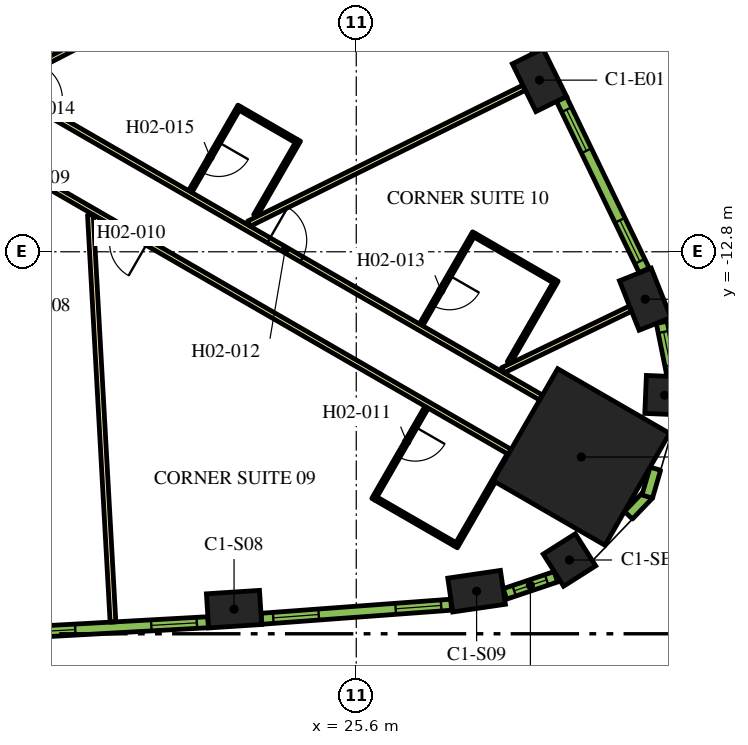
"""IFC4 building model, lengths in metres.
Left out: names, types, materials, properties, quantities, classifications, styles, units other than length and angle.
Written with IfcOpenShell. Run it as: python <this file> out.ifc"""

import sys

from ifc_helpers import new_model, si_unit, direction, frame, frame_2d, origin, origin_2d, place, context, subcontext, project, spatial, rectangle, extrude, element, fill, save


model = new_model("IFC4")
c1 = context("Model", 3, precision=1e-05, world=origin(), true_north=direction((0.0, 1.0)))
c2 = subcontext(c1, "Body", "Model", "MODEL_VIEW")
j1 = project(units=[si_unit("LENGTHUNIT", "METRE"), si_unit("PLANEANGLEUNIT", "RADIAN")], contexts=[c1])
p1 = place(None, origin())
s1 = spatial("IfcSite", under=j1, at=p1, CompositionType="ELEMENT")
p2 = place(p1, origin())
s2 = spatial("IfcBuilding", under=s1, at=p2, CompositionType="ELEMENT")
p3 = place(p2, frame((0.0, 0.0, 47.1)))
s3 = spatial("IfcBuildingStorey", under=s2, at=p3, CompositionType="ELEMENT", Elevation=47.1)
p4 = place(p3, frame((31.522, -18.199, 0.0), z_axis=(0.0, 0.0, 1.0), x_axis=(0.866025403784, -0.5, 0.0)))
e1 = element("IfcColumn", 1, at=p4, inside=s3, PredefinedType="COLUMN", context=c2, shape_type="SweptSolid", body=[
    extrude(rectangle(XDim=3.4, YDim=3.4, at=origin_2d()), origin(), (0.0, 0.0, 1.0), 3.9),
])
for number, where, z_axis, x_axis in (
    (2, (22.385, -22.204, 0.0), (0.0, 0.0, 1.0), (0.998, 0.065, 0.0)),
    (3, (28.767, -21.731, 0.0), (0.0, 0.0, 1.0), (0.989, 0.145, 0.0)),
):
    element("IfcColumn", number, at=place(p3, frame(where, z_axis=z_axis, x_axis=x_axis)), inside=s3, PredefinedType="COLUMN", context=c2, shape_type="SweptSolid", body=[
        extrude(rectangle(XDim=1.4, YDim=0.9, at=origin_2d()), origin(), (0.0, 0.0, 1.0), 3.9),
    ])
for number, where, z_axis, x_axis in (
    (4, (31.21, -20.91, 0.0), (0.0, 0.0, 1.0), (0.844, 0.536, 0.0)),
    (5, (33.713, -16.574, 0.0), (0.0, 0.0, 1.0), (0.042, 0.999, 0.0)),
):
    element("IfcColumn", number, at=place(p3, frame(where, z_axis=z_axis, x_axis=x_axis)), inside=s3, PredefinedType="COLUMN", context=c2, shape_type="SweptSolid", body=[
        extrude(rectangle(XDim=1.0, YDim=1.0, at=origin_2d()), origin(), (0.0, 0.0, 1.0), 3.9),
    ])
for number, where, z_axis, x_axis in (
    (6, (33.203, -14.047, 0.0), (0.0, 0.0, 1.0), (-0.369, 0.929, 0.0)),
    (7, (30.421, -8.284, 0.0), (0.0, 0.0, 1.0), (-0.443, 0.897, 0.0)),
):
    element("IfcColumn", number, at=place(p3, frame(where, z_axis=z_axis, x_axis=x_axis)), inside=s3, PredefinedType="COLUMN", context=c2, shape_type="SweptSolid", body=[
        extrude(rectangle(XDim=1.4, YDim=0.9, at=origin_2d()), origin(), (0.0, 0.0, 1.0), 3.9),
    ])
p5 = place(p3, frame((16.412, -8.523, 0.0), z_axis=(0.0, 0.0, 1.0), x_axis=(0.866022197818, -0.500005552856, 0.0)))
e8 = element("IfcWall", 8, at=p5, inside=s3, PredefinedType="PARTITIONING", context=c2, shape_type="SweptSolid", body=[
    extrude(rectangle(XDim=16.224, YDim=0.15, at=frame_2d((8.112, 0.0))), origin(), (0.0, 0.0, 1.0), 2.75),
])
p6 = place(p5, frame((7.949, 0.0, 0.0)))
e9 = element("IfcOpeningElement", 9, at=p6, cuts=e8, PredefinedType="OPENING", context=c2, shape_type="SweptSolid", body=[
    extrude(rectangle(XDim=1.0, YDim=2.1, at=frame_2d((0.5, 1.05))), frame((0.0, 0.085, 0.0), z_axis=(0.0, -1.0, 0.0), x_axis=(1.0, 0.0, 0.0)), (0.0, 0.0, 1.0), 0.17),
])
p7 = place(p5, frame((0.526, 0.0, 0.0)))
e10 = element("IfcOpeningElement", 10, at=p7, cuts=e8, PredefinedType="OPENING", context=c2, shape_type="SweptSolid", body=[
    extrude(rectangle(XDim=1.0, YDim=2.1, at=frame_2d((0.5, 1.05))), frame((0.0, 0.085, 0.0), z_axis=(0.0, -1.0, 0.0), x_axis=(1.0, 0.0, 0.0)), (0.0, 0.0, 1.0), 0.17),
])
p8 = place(p3, frame((19.081, -3.9, 0.0), z_axis=(0.0, 0.0, 1.0), x_axis=(-0.499974327079, -0.866040225545, 0.0)))
e11 = element("IfcWall", 11, at=p8, inside=s3, PredefinedType="PARTITIONING", context=c2, shape_type="SweptSolid", body=[
    extrude(rectangle(XDim=5.258, YDim=0.15, at=frame_2d((2.629, 0.0))), origin(), (0.0, 0.0, 1.0), 2.75),
])
p9 = place(p3, frame((29.638, -18.064, 0.0), z_axis=(0.0, 0.0, 1.0), x_axis=(-0.866026175601, 0.499998663172, 0.0)))
e12 = element("IfcWall", 12, at=p9, inside=s3, PredefinedType="PARTITIONING", context=c2, shape_type="SweptSolid", body=[
    extrude(rectangle(XDim=16.144, YDim=0.15, at=frame_2d((8.072, 0.0))), origin(), (0.0, 0.0, 1.0), 2.75),
])
p10 = place(p9, frame((13.948, 0.0, 0.0)))
e13 = element("IfcOpeningElement", 13, at=p10, cuts=e12, PredefinedType="OPENING", context=c2, shape_type="SweptSolid", body=[
    extrude(rectangle(XDim=0.9, YDim=2.1, at=frame_2d((0.45, 1.05))), frame((0.0, 0.085, 0.0), z_axis=(0.0, -1.0, 0.0), x_axis=(1.0, 0.0, 0.0)), (0.0, 0.0, 1.0), 0.17),
])
p11 = place(p9, frame((11.004, 0.0, 0.0)))
e14 = element("IfcOpeningElement", 14, at=p11, cuts=e12, PredefinedType="OPENING", context=c2, shape_type="SweptSolid", body=[
    extrude(rectangle(XDim=1.0, YDim=2.1, at=frame_2d((0.5, 1.05))), frame((0.0, 0.085, 0.0), z_axis=(0.0, -1.0, 0.0), x_axis=(1.0, 0.0, 0.0)), (0.0, 0.0, 1.0), 0.17),
])
p12 = place(p3, frame((27.134, -2.779, 0.0), z_axis=(0.0, 0.0, 1.0), x_axis=(-0.8882049501, -0.459447457951, 0.0)))
e15 = element("IfcWall", 15, at=p12, inside=s3, PredefinedType="PARTITIONING", context=c2, shape_type="SweptSolid", body=[
    extrude(rectangle(XDim=11.638, YDim=0.15, at=frame_2d((5.819, 0.0))), origin(), (0.0, 0.0, 1.0), 2.75),
])
p13 = place(p3, frame((19.198, -22.541, 0.0), z_axis=(0.0, 0.0, 1.0), x_axis=(-0.055432210572, 0.99846245299, 0.0)))
e16 = element("IfcWall", 16, at=p13, inside=s3, PredefinedType="PARTITIONING", context=c2, shape_type="SweptSolid", body=[
    extrude(rectangle(XDim=10.729, YDim=0.15, at=frame_2d((5.365, 0.0))), origin(), (0.0, 0.0, 1.0), 2.75),
])
p14 = place(p3, frame((30.018, -8.483, 0.0), z_axis=(0.0, 0.0, 1.0), x_axis=(-0.896544505264, -0.44295366584, 0.0)))
e17 = element("IfcWall", 17, at=p14, inside=s3, PredefinedType="PARTITIONING", context=c2, shape_type="SweptSolid", body=[
    extrude(rectangle(XDim=8.079, YDim=0.15, at=frame_2d((4.04, 0.0))), origin(), (0.0, 0.0, 1.0), 2.75),
])
p15 = place(p3, frame((32.817, -14.296, 0.0), z_axis=(0.0, 0.0, 1.0), x_axis=(-0.900616957918, -0.434613730927, 0.0)))
e18 = element("IfcWall", 18, at=p15, inside=s3, PredefinedType="PARTITIONING", context=c2, shape_type="SweptSolid", body=[
    extrude(rectangle(XDim=3.733, YDim=0.15, at=frame_2d((1.867, 0.0))), origin(), (0.0, 0.0, 1.0), 2.75),
])
p16 = place(p3, frame((27.452, -16.889, 0.0), z_axis=(0.0, 0.0, 1.0), x_axis=(-0.49998411664, -0.866034573852, 0.0)))
e19 = element("IfcWall", 19, at=p16, inside=s3, PredefinedType="PARTITIONING", context=c2, shape_type="SweptSolid", body=[
    extrude(rectangle(XDim=2.8, YDim=0.1, at=frame_2d((1.4, 0.0))), origin(), (0.0, 0.0, 1.0), 2.75),
])
p17 = place(p16, frame((0.6, 0.0, 0.0)))
e20 = element("IfcOpeningElement", 20, at=p17, cuts=e19, PredefinedType="OPENING", context=c2, shape_type="SweptSolid", body=[
    extrude(rectangle(XDim=0.9, YDim=2.1, at=frame_2d((0.45, 1.05))), frame((0.0, 0.06, 0.0), z_axis=(0.0, -1.0, 0.0), x_axis=(1.0, 0.0, 0.0)), (0.0, 0.0, 1.0), 0.12),
])
p18 = place(p3, frame((26.121, -19.295, 0.0), z_axis=(0.0, 0.0, 1.0), x_axis=(0.866006032174, -0.500033551112, 0.0)))
e21 = element("IfcWall", 21, at=p18, inside=s3, PredefinedType="PARTITIONING", context=c2, shape_type="SweptSolid", body=[
    extrude(rectangle(XDim=2.4, YDim=0.1, at=frame_2d((1.2, 0.0))), origin(), (0.0, 0.0, 1.0), 2.75),
])
p19 = place(p3, frame((29.617, -18.139, 0.0), z_axis=(0.0, 0.0, 1.0), x_axis=(-0.49998411664, -0.866034573852, 0.0)))
e22 = element("IfcWall", 22, at=p19, inside=s3, PredefinedType="PARTITIONING", context=c2, shape_type="SweptSolid", body=[
    extrude(rectangle(XDim=2.8, YDim=0.1, at=frame_2d((1.4, 0.0))), origin(), (0.0, 0.0, 1.0), 2.75),
])
p20 = place(p3, frame((28.704, -12.3, 0.0), z_axis=(0.0, 0.0, 1.0), x_axis=(-0.49998411664, -0.866034573852, 0.0)))
e23 = element("IfcWall", 23, at=p20, inside=s3, PredefinedType="PARTITIONING", context=c2, shape_type="SweptSolid", body=[
    extrude(rectangle(XDim=2.8, YDim=0.1, at=frame_2d((1.4, 0.0))), origin(), (0.0, 0.0, 1.0), 2.75),
])
p21 = place(p20, frame((1.3, 0.0, 0.0)))
e24 = element("IfcOpeningElement", 24, at=p21, cuts=e23, PredefinedType="OPENING", context=c2, shape_type="SweptSolid", body=[
    extrude(rectangle(XDim=0.9, YDim=2.1, at=frame_2d((0.45, 1.05))), frame((0.0, 0.06, 0.0), z_axis=(0.0, -1.0, 0.0), x_axis=(1.0, 0.0, 0.0)), (0.0, 0.0, 1.0), 0.12),
])
p22 = place(p3, frame((28.722, -12.368, 0.0), z_axis=(0.0, 0.0, 1.0), x_axis=(0.866050077142, -0.499957262057, 0.0)))
e25 = element("IfcWall", 25, at=p22, inside=s3, PredefinedType="PARTITIONING", context=c2, shape_type="SweptSolid", body=[
    extrude(rectangle(XDim=2.4, YDim=0.1, at=frame_2d((1.2, 0.0))), origin(), (0.0, 0.0, 1.0), 2.75),
])
p23 = place(p3, frame((29.619, -15.715, 0.0), z_axis=(0.0, 0.0, 1.0), x_axis=(0.500004234368, 0.866022959057, 0.0)))
e26 = element("IfcWall", 26, at=p23, inside=s3, PredefinedType="PARTITIONING", context=c2, shape_type="SweptSolid", body=[
    extrude(rectangle(XDim=2.5, YDim=0.1, at=frame_2d((1.25, 0.0))), origin(), (0.0, 0.0, 1.0), 2.75),
])
p24 = place(p3, frame((22.53, -8.966, 0.0), z_axis=(0.0, 0.0, 1.0), x_axis=(-0.500006934395, -0.866021400173, 0.0)))
e27 = element("IfcWall", 27, at=p24, inside=s3, PredefinedType="PARTITIONING", context=c2, shape_type="SweptSolid", body=[
    extrude(rectangle(XDim=2.6, YDim=0.1, at=frame_2d((1.3, 0.0))), origin(), (0.0, 0.0, 1.0), 2.75),
])
p25 = place(p24, frame((1.1, 0.0, 0.0)))
e28 = element("IfcOpeningElement", 28, at=p25, cuts=e27, PredefinedType="OPENING", context=c2, shape_type="SweptSolid", body=[
    extrude(rectangle(XDim=0.9, YDim=2.1, at=frame_2d((0.45, 1.05))), frame((0.0, 0.06, 0.0), z_axis=(0.0, -1.0, 0.0), x_axis=(1.0, 0.0, 0.0)), (0.0, 0.0, 1.0), 0.12),
])
p26 = place(p3, frame((22.549, -9.035, 0.0), z_axis=(0.0, 0.0, 1.0), x_axis=(0.86605165483, -0.499954529098, 0.0)))
e29 = element("IfcWall", 29, at=p26, inside=s3, PredefinedType="PARTITIONING", context=c2, shape_type="SweptSolid", body=[
    extrude(rectangle(XDim=1.7, YDim=0.1, at=frame_2d((0.85, 0.0))), origin(), (0.0, 0.0, 1.0), 2.75),
])
p27 = place(p3, frame((22.944, -11.85, 0.0), z_axis=(0.0, 0.0, 1.0), x_axis=(0.499968531483, 0.866043571379, 0.0)))
e30 = element("IfcWall", 30, at=p27, inside=s3, PredefinedType="PARTITIONING", context=c2, shape_type="SweptSolid", body=[
    extrude(rectangle(XDim=2.29, YDim=0.1, at=frame_2d((1.145, 0.0))), origin(), (0.0, 0.0, 1.0), 2.75),
])
p28 = place(p3, frame((16.711, -22.824, 0.0), z_axis=(0.0, 0.0, 1.0), x_axis=(0.998464708705, 0.055391564976, 0.0)))
e31 = element("IfcWall", 31, at=p28, inside=s3, PredefinedType="SOLIDWALL", context=c2, shape_type="SweptSolid", body=[
    extrude(rectangle(XDim=4.998, YDim=0.29, at=frame_2d((2.499, 0.0))), origin(), (0.0, 0.0, 1.0), 3.65),
])
p29 = place(p28, frame((0.297, 0.0, 0.9)))
e32 = element("IfcOpeningElement", 32, at=p29, cuts=e31, PredefinedType="OPENING", context=c2, shape_type="SweptSolid", body=[
    extrude(rectangle(XDim=1.2, YDim=2.15, at=frame_2d((0.6, 1.075))), frame((0.0, 0.155, 0.0), z_axis=(0.0, -1.0, 0.0), x_axis=(1.0, 0.0, 0.0)), (0.0, 0.0, 1.0), 0.31),
])
p30 = place(p28, frame((3.501, 0.0, 0.9)))
e33 = element("IfcOpeningElement", 33, at=p30, cuts=e31, PredefinedType="OPENING", context=c2, shape_type="SweptSolid", body=[
    extrude(rectangle(XDim=1.2, YDim=2.15, at=frame_2d((0.6, 1.075))), frame((0.0, 0.155, 0.0), z_axis=(0.0, -1.0, 0.0), x_axis=(1.0, 0.0, 0.0)), (0.0, 0.0, 1.0), 0.31),
])
p31 = place(p3, frame((23.106, -22.456, 0.0), z_axis=(0.0, 0.0, 1.0), x_axis=(0.997266290399, 0.073891447643, 0.0)))
e34 = element("IfcWall", 34, at=p31, inside=s3, PredefinedType="SOLIDWALL", context=c2, shape_type="SweptSolid", body=[
    extrude(rectangle(XDim=5.006, YDim=0.29, at=frame_2d((2.503, 0.0))), origin(), (0.0, 0.0, 1.0), 3.65),
])
p32 = place(p31, frame((0.31, 0.0, 0.9)))
e35 = element("IfcOpeningElement", 35, at=p32, cuts=e34, PredefinedType="OPENING", context=c2, shape_type="SweptSolid", body=[
    extrude(rectangle(XDim=1.2, YDim=2.15, at=frame_2d((0.6, 1.075))), frame((0.0, 0.155, 0.0), z_axis=(0.0, -1.0, 0.0), x_axis=(1.0, 0.0, 0.0)), (0.0, 0.0, 1.0), 0.31),
])
p33 = place(p31, frame((3.54, 0.0, 0.9)))
e36 = element("IfcOpeningElement", 36, at=p33, cuts=e34, PredefinedType="OPENING", context=c2, shape_type="SweptSolid", body=[
    extrude(rectangle(XDim=1.2, YDim=2.15, at=frame_2d((0.6, 1.075))), frame((0.0, 0.155, 0.0), z_axis=(0.0, -1.0, 0.0), x_axis=(1.0, 0.0, 0.0)), (0.0, 0.0, 1.0), 0.31),
])
p34 = place(p3, frame((29.512, -21.802, 0.0), z_axis=(0.0, 0.0, 1.0), x_axis=(0.947903891592, 0.318556450734, 0.0)))
e37 = element("IfcWall", 37, at=p34, inside=s3, PredefinedType="SOLIDWALL", context=c2, shape_type="SweptSolid", body=[
    extrude(rectangle(XDim=1.415, YDim=0.29, at=frame_2d((0.708, 0.0))), origin(), (0.0, 0.0, 1.0), 3.65),
])
p35 = place(p34, frame((0.257, 0.0, 0.9)))
e38 = element("IfcOpeningElement", 38, at=p35, cuts=e37, PredefinedType="OPENING", context=c2, shape_type="SweptSolid", body=[
    extrude(rectangle(XDim=0.9, YDim=2.15, at=frame_2d((0.45, 1.075))), frame((0.0, 0.155, 0.0), z_axis=(0.0, -1.0, 0.0), x_axis=(1.0, 0.0, 0.0)), (0.0, 0.0, 1.0), 0.31),
])
for number, where, z_axis, x_axis in (
    (39, (32.762, -19.732, 0.0), (0.0, 0.0, 1.0), (0.692, 0.722, 0.0)),
    (40, (33.257, -19.241, 0.0), (0.0, 0.0, 1.0), (0.279, 0.96, 0.0)),
):
    element("IfcWall", number, at=place(p3, frame(where, z_axis=z_axis, x_axis=x_axis)), inside=s3, PredefinedType="SOLIDWALL", context=c2, shape_type="SweptSolid", body=[
        extrude(rectangle(XDim=0.764, YDim=0.29, at=frame_2d((0.382, 0.0))), origin(), (0.0, 0.0, 1.0), 3.65),
    ])
p36 = place(p3, frame((33.917, -16.044, 0.0), z_axis=(0.0, 0.0, 1.0), x_axis=(-0.198106888228, 0.980180422594, 0.0)))
e41 = element("IfcWall", 41, at=p36, inside=s3, PredefinedType="SOLIDWALL", context=c2, shape_type="SweptSolid", body=[
    extrude(rectangle(XDim=1.415, YDim=0.29, at=frame_2d((0.708, 0.0))), origin(), (0.0, 0.0, 1.0), 3.65),
])
p37 = place(p36, frame((0.257, 0.0, 0.9)))
e42 = element("IfcOpeningElement", 42, at=p37, cuts=e41, PredefinedType="OPENING", context=c2, shape_type="SweptSolid", body=[
    extrude(rectangle(XDim=0.9, YDim=2.15, at=frame_2d((0.45, 1.075))), frame((0.0, 0.155, 0.0), z_axis=(0.0, -1.0, 0.0), x_axis=(1.0, 0.0, 0.0)), (0.0, 0.0, 1.0), 0.31),
])
p38 = place(p3, frame((33.176, -13.29, 0.0), z_axis=(0.0, 0.0, 1.0), x_axis=(-0.434664499056, 0.900592456808, 0.0)))
e43 = element("IfcWall", 43, at=p38, inside=s3, PredefinedType="SOLIDWALL", context=c2, shape_type="SweptSolid", body=[
    extrude(rectangle(XDim=5.006, YDim=0.29, at=frame_2d((2.503, 0.0))), origin(), (0.0, 0.0, 1.0), 3.65),
])
p39 = place(p38, frame((0.265, 0.0, 0.9)))
e44 = element("IfcOpeningElement", 44, at=p39, cuts=e43, PredefinedType="OPENING", context=c2, shape_type="SweptSolid", body=[
    extrude(rectangle(XDim=1.2, YDim=2.15, at=frame_2d((0.6, 1.075))), frame((0.0, 0.155, 0.0), z_axis=(0.0, -1.0, 0.0), x_axis=(1.0, 0.0, 0.0)), (0.0, 0.0, 1.0), 0.31),
])
p40 = place(p38, frame((3.496, 0.0, 0.9)))
e45 = element("IfcOpeningElement", 45, at=p40, cuts=e43, PredefinedType="OPENING", context=c2, shape_type="SweptSolid", body=[
    extrude(rectangle(XDim=1.2, YDim=2.15, at=frame_2d((0.6, 1.075))), frame((0.0, 0.155, 0.0), z_axis=(0.0, -1.0, 0.0), x_axis=(1.0, 0.0, 0.0)), (0.0, 0.0, 1.0), 0.31),
])
p41 = place(p3, frame((30.377, -7.521, 0.0), z_axis=(0.0, 0.0, 1.0), x_axis=(-0.451233929645, 0.892405704115, 0.0)))
e46 = element("IfcWall", 46, at=p41, inside=s3, PredefinedType="SOLIDWALL", context=c2, shape_type="SweptSolid", body=[
    extrude(rectangle(XDim=4.998, YDim=0.29, at=frame_2d((2.499, 0.0))), origin(), (0.0, 0.0, 1.0), 3.65),
])
p42 = place(p41, frame((0.297, 0.0, 0.9)))
e47 = element("IfcOpeningElement", 47, at=p42, cuts=e46, PredefinedType="OPENING", context=c2, shape_type="SweptSolid", body=[
    extrude(rectangle(XDim=1.2, YDim=2.15, at=frame_2d((0.6, 1.075))), frame((0.0, 0.155, 0.0), z_axis=(0.0, -1.0, 0.0), x_axis=(1.0, 0.0, 0.0)), (0.0, 0.0, 1.0), 0.31),
])
p43 = place(p41, frame((3.501, 0.0, 0.9)))
e48 = element("IfcOpeningElement", 48, at=p43, cuts=e46, PredefinedType="OPENING", context=c2, shape_type="SweptSolid", body=[
    extrude(rectangle(XDim=1.2, YDim=2.15, at=frame_2d((0.6, 1.075))), frame((0.0, 0.155, 0.0), z_axis=(0.0, -1.0, 0.0), x_axis=(1.0, 0.0, 0.0)), (0.0, 0.0, 1.0), 0.31),
])
p44 = place(p11, origin())
e49 = element("IfcDoor", 49, at=p44, inside=s3, OperationType="SINGLE_SWING_RIGHT", PredefinedType="DOOR", context=c2, shape_type="SweptSolid", body=[
    extrude(rectangle(XDim=1.0, YDim=2.1, at=frame_2d((0.5, 1.05))), frame((0.0, 0.025, 0.0), z_axis=(0.0, -1.0, 0.0), x_axis=(1.0, 0.0, 0.0)), (0.0, 0.0, 1.0), 0.05),
])
fill(e14, e49)
p45 = place(p17, origin())
e50 = element("IfcDoor", 50, at=p45, inside=s3, OperationType="SINGLE_SWING_RIGHT", PredefinedType="DOOR", context=c2, shape_type="SweptSolid", body=[
    extrude(rectangle(XDim=0.9, YDim=2.1, at=frame_2d((0.45, 1.05))), frame((0.0, 0.025, 0.0), z_axis=(0.0, -1.0, 0.0), x_axis=(1.0, 0.0, 0.0)), (0.0, 0.0, 1.0), 0.05),
])
fill(e20, e50)
p46 = place(p6, origin())
e51 = element("IfcDoor", 51, at=p46, inside=s3, OperationType="SINGLE_SWING_LEFT", PredefinedType="DOOR", context=c2, shape_type="SweptSolid", body=[
    extrude(rectangle(XDim=1.0, YDim=2.1, at=frame_2d((0.5, 1.05))), frame((0.0, 0.025, 0.0), z_axis=(0.0, -1.0, 0.0), x_axis=(1.0, 0.0, 0.0)), (0.0, 0.0, 1.0), 0.05),
])
fill(e9, e51)
p47 = place(p21, origin())
e52 = element("IfcDoor", 52, at=p47, inside=s3, OperationType="SINGLE_SWING_LEFT", PredefinedType="DOOR", context=c2, shape_type="SweptSolid", body=[
    extrude(rectangle(XDim=0.9, YDim=2.1, at=frame_2d((0.45, 1.05))), frame((0.0, 0.025, 0.0), z_axis=(0.0, -1.0, 0.0), x_axis=(1.0, 0.0, 0.0)), (0.0, 0.0, 1.0), 0.05),
])
fill(e24, e52)
p48 = place(p7, origin())
e53 = element("IfcDoor", 53, at=p48, inside=s3, OperationType="SINGLE_SWING_LEFT", PredefinedType="DOOR", context=c2, shape_type="SweptSolid", body=[
    extrude(rectangle(XDim=1.0, YDim=2.1, at=frame_2d((0.5, 1.05))), frame((0.0, 0.025, 0.0), z_axis=(0.0, -1.0, 0.0), x_axis=(1.0, 0.0, 0.0)), (0.0, 0.0, 1.0), 0.05),
])
fill(e10, e53)
p49 = place(p25, origin())
e54 = element("IfcDoor", 54, at=p49, inside=s3, OperationType="SINGLE_SWING_LEFT", PredefinedType="DOOR", context=c2, shape_type="SweptSolid", body=[
    extrude(rectangle(XDim=0.9, YDim=2.1, at=frame_2d((0.45, 1.05))), frame((0.0, 0.025, 0.0), z_axis=(0.0, -1.0, 0.0), x_axis=(1.0, 0.0, 0.0)), (0.0, 0.0, 1.0), 0.05),
])
fill(e28, e54)
p50 = place(p29, origin())
e55 = element("IfcWindow", 55, at=p50, inside=s3, PartitioningType="DOUBLE_PANEL_VERTICAL", PredefinedType="WINDOW", context=c2, shape_type="SweptSolid", body=[
    extrude(rectangle(XDim=1.2, YDim=2.15, at=frame_2d((0.6, 1.075))), frame((0.0, 0.015, 0.0), z_axis=(0.0, -1.0, 0.0), x_axis=(1.0, 0.0, 0.0)), (0.0, 0.0, 1.0), 0.06),
])
fill(e32, e55)
p51 = place(p30, origin())
e56 = element("IfcWindow", 56, at=p51, inside=s3, PartitioningType="DOUBLE_PANEL_VERTICAL", PredefinedType="WINDOW", context=c2, shape_type="SweptSolid", body=[
    extrude(rectangle(XDim=1.2, YDim=2.15, at=frame_2d((0.6, 1.075))), frame((0.0, 0.015, 0.0), z_axis=(0.0, -1.0, 0.0), x_axis=(1.0, 0.0, 0.0)), (0.0, 0.0, 1.0), 0.06),
])
fill(e33, e56)
p52 = place(p32, origin())
e57 = element("IfcWindow", 57, at=p52, inside=s3, PartitioningType="DOUBLE_PANEL_VERTICAL", PredefinedType="WINDOW", context=c2, shape_type="SweptSolid", body=[
    extrude(rectangle(XDim=1.2, YDim=2.15, at=frame_2d((0.6, 1.075))), frame((0.0, 0.015, 0.0), z_axis=(0.0, -1.0, 0.0), x_axis=(1.0, 0.0, 0.0)), (0.0, 0.0, 1.0), 0.06),
])
fill(e35, e57)
p53 = place(p33, origin())
e58 = element("IfcWindow", 58, at=p53, inside=s3, PartitioningType="DOUBLE_PANEL_VERTICAL", PredefinedType="WINDOW", context=c2, shape_type="SweptSolid", body=[
    extrude(rectangle(XDim=1.2, YDim=2.15, at=frame_2d((0.6, 1.075))), frame((0.0, 0.015, 0.0), z_axis=(0.0, -1.0, 0.0), x_axis=(1.0, 0.0, 0.0)), (0.0, 0.0, 1.0), 0.06),
])
fill(e36, e58)
p54 = place(p35, origin())
e59 = element("IfcWindow", 59, at=p54, inside=s3, PartitioningType="SINGLE_PANEL", PredefinedType="WINDOW", context=c2, shape_type="SweptSolid", body=[
    extrude(rectangle(XDim=0.9, YDim=2.15, at=frame_2d((0.45, 1.075))), frame((0.0, 0.015, 0.0), z_axis=(0.0, -1.0, 0.0), x_axis=(1.0, 0.0, 0.0)), (0.0, 0.0, 1.0), 0.06),
])
fill(e38, e59)
p55 = place(p37, origin())
e60 = element("IfcWindow", 60, at=p55, inside=s3, PartitioningType="SINGLE_PANEL", PredefinedType="WINDOW", context=c2, shape_type="SweptSolid", body=[
    extrude(rectangle(XDim=0.9, YDim=2.15, at=frame_2d((0.45, 1.075))), frame((0.0, 0.015, 0.0), z_axis=(0.0, -1.0, 0.0), x_axis=(1.0, 0.0, 0.0)), (0.0, 0.0, 1.0), 0.06),
])
fill(e42, e60)
p56 = place(p39, origin())
e61 = element("IfcWindow", 61, at=p56, inside=s3, PartitioningType="DOUBLE_PANEL_VERTICAL", PredefinedType="WINDOW", context=c2, shape_type="SweptSolid", body=[
    extrude(rectangle(XDim=1.2, YDim=2.15, at=frame_2d((0.6, 1.075))), frame((0.0, 0.015, 0.0), z_axis=(0.0, -1.0, 0.0), x_axis=(1.0, 0.0, 0.0)), (0.0, 0.0, 1.0), 0.06),
])
fill(e44, e61)
p57 = place(p40, origin())
e62 = element("IfcWindow", 62, at=p57, inside=s3, PartitioningType="DOUBLE_PANEL_VERTICAL", PredefinedType="WINDOW", context=c2, shape_type="SweptSolid", body=[
    extrude(rectangle(XDim=1.2, YDim=2.15, at=frame_2d((0.6, 1.075))), frame((0.0, 0.015, 0.0), z_axis=(0.0, -1.0, 0.0), x_axis=(1.0, 0.0, 0.0)), (0.0, 0.0, 1.0), 0.06),
])
fill(e45, e62)
save(model, sys.argv[1])
